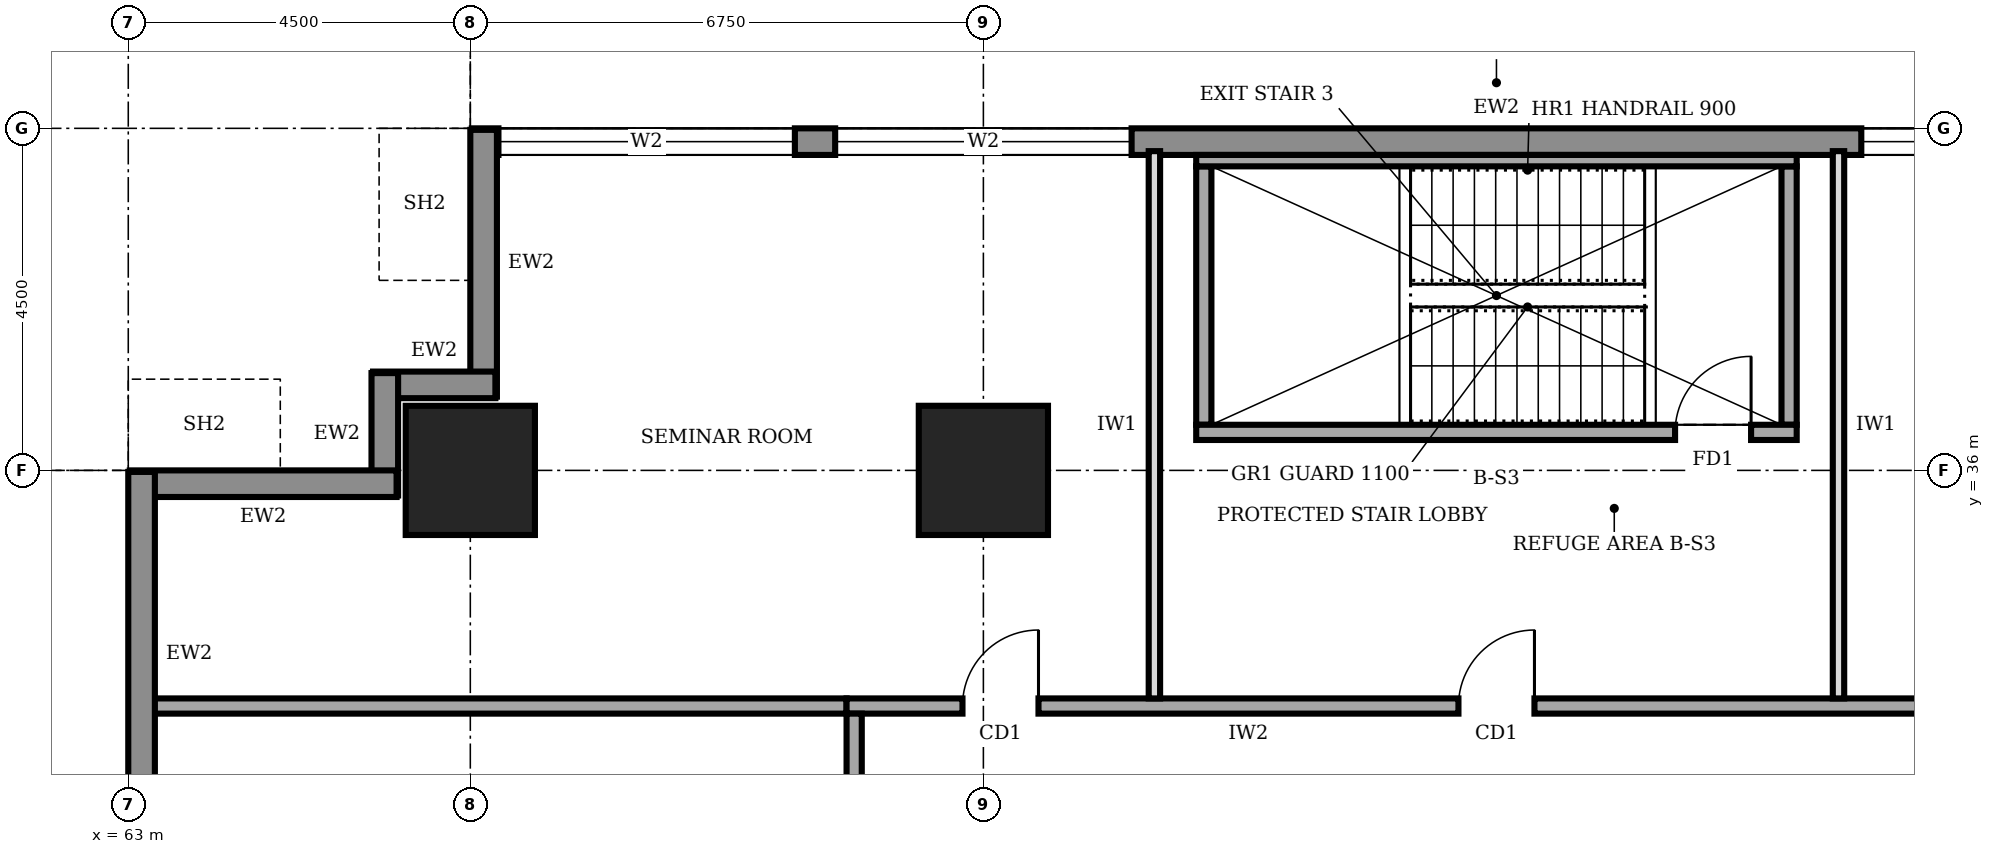
"""IFC4 building model, lengths in metres.
Left out: names, types, materials, properties, quantities, classifications, styles, units other than length and angle.
Written with IfcOpenShell. Run it as: python <this file> out.ifc"""

import sys

from ifc_helpers import new_model, si_unit, direction, frame, frame_2d, origin, origin_2d, place, context, subcontext, project, spatial, rectangle, extrude, element, fill, save


model = new_model("IFC4")
c1 = context("Model", 3, precision=1e-05, world=origin(), true_north=direction((0.0, 1.0)))
c2 = subcontext(c1, "Body", "Model", "MODEL_VIEW")
j1 = project(units=[si_unit("LENGTHUNIT", "METRE"), si_unit("PLANEANGLEUNIT", "RADIAN")], contexts=[c1])
p1 = place(None, origin())
s1 = spatial("IfcSite", under=j1, at=p1, CompositionType="ELEMENT")
p2 = place(p1, origin())
s2 = spatial("IfcBuilding", under=s1, at=p2, CompositionType="ELEMENT")
p3 = place(p2, frame((0.0, 0.0, 65.0)))
s3 = spatial("IfcBuildingStorey", under=s2, at=p3, CompositionType="ELEMENT", Elevation=65.0)
for number, where, z_axis, x_axis in (
    (1, (67.5, 36.0, 0.0), (0.0, 0.0, 1.0), (1.0, 0.0, 0.0)),
    (2, (74.25, 36.0, 0.0), (0.0, 0.0, 1.0), (1.0, 0.0, 0.0)),
):
    element("IfcColumn", number, at=place(p3, frame(where, z_axis=z_axis, x_axis=x_axis)), inside=s3, PredefinedType="COLUMN", context=c2, shape_type="SweptSolid", body=[
        extrude(rectangle(XDim=1.7, YDim=1.7, at=origin_2d()), origin(), (0.0, 0.0, 1.0), 4.0),
    ])
p4 = place(p3, frame((94.48, 40.325, 0.0), z_axis=(0.0, 0.0, 1.0), x_axis=(-1.0, 0.0, 0.0)))
e3 = element("IfcWall", 3, at=p4, inside=s3, PredefinedType="STANDARD", context=c2, shape_type="SweptSolid", body=[
    extrude(rectangle(XDim=26.96, YDim=0.35, at=frame_2d((13.48, 0.0))), origin(), (0.0, 0.0, 1.0), 3.75),
])
p5 = place(p4, frame((22.71, 0.0, 0.6)))
e4 = element("IfcOpeningElement", 4, at=p5, cuts=e3, PredefinedType="OPENING", context=c2, shape_type="SweptSolid", body=[
    extrude(rectangle(XDim=3.9, YDim=2.6, at=frame_2d((1.95, 1.3))), frame((0.0, 0.185, 0.0), z_axis=(0.0, -1.0, 0.0), x_axis=(1.0, 0.0, 0.0)), (0.0, 0.0, 1.0), 0.37),
])
p6 = place(p4, frame((18.28, 0.0, 0.6)))
e5 = element("IfcOpeningElement", 5, at=p6, cuts=e3, PredefinedType="OPENING", context=c2, shape_type="SweptSolid", body=[
    extrude(rectangle(XDim=3.9, YDim=2.6, at=frame_2d((1.95, 1.3))), frame((0.0, 0.185, 0.0), z_axis=(0.0, -1.0, 0.0), x_axis=(1.0, 0.0, 0.0)), (0.0, 0.0, 1.0), 0.37),
])
p7 = place(p4, frame((4.78, 0.0, 0.6)))
e6 = element("IfcOpeningElement", 6, at=p7, cuts=e3, PredefinedType="OPENING", context=c2, shape_type="SweptSolid", body=[
    extrude(rectangle(XDim=3.9, YDim=2.6, at=frame_2d((1.95, 1.3))), frame((0.0, 0.185, 0.0), z_axis=(0.0, -1.0, 0.0), x_axis=(1.0, 0.0, 0.0)), (0.0, 0.0, 1.0), 0.37),
])
p8 = place(p3, frame((67.675, 40.48, 0.0), z_axis=(0.0, 0.0, 1.0), x_axis=(0.0, -1.0, 0.0)))
e7 = element("IfcWall", 7, at=p8, inside=s3, PredefinedType="STANDARD", context=c2, shape_type="SweptSolid", body=[
    extrude(rectangle(XDim=3.51, YDim=0.35, at=frame_2d((1.755, 0.0))), origin(), (0.0, 0.0, 1.0), 2.85),
])
for number, where, z_axis, x_axis in (
    (8, (67.83, 37.125, 0.0), (0.0, 0.0, 1.0), (-1.0, 0.0, 0.0)),
    (9, (66.375, 37.28, 0.0), (0.0, 0.0, 1.0), (0.0, -1.0, 0.0)),
):
    element("IfcWall", number, at=place(p3, frame(where, z_axis=z_axis, x_axis=x_axis)), inside=s3, PredefinedType="STANDARD", context=c2, shape_type="SweptSolid", body=[
        extrude(rectangle(XDim=1.61, YDim=0.35, at=frame_2d((0.805, 0.0))), origin(), (0.0, 0.0, 1.0), 3.75),
    ])
p9 = place(p3, frame((66.53, 35.825, 0.0), z_axis=(0.0, 0.0, 1.0), x_axis=(-1.0, 0.0, 0.0)))
e10 = element("IfcWall", 10, at=p9, inside=s3, PredefinedType="STANDARD", context=c2, shape_type="SweptSolid", body=[
    extrude(rectangle(XDim=3.51, YDim=0.35, at=frame_2d((1.755, 0.0))), origin(), (0.0, 0.0, 1.0), 2.85),
])
p10 = place(p3, frame((63.175, 35.98, 0.0), z_axis=(0.0, 0.0, 1.0), x_axis=(0.0, -1.0, 0.0)))
e11 = element("IfcWall", 11, at=p10, inside=s3, PredefinedType="STANDARD", context=c2, shape_type="SweptSolid", body=[
    extrude(rectangle(XDim=31.46, YDim=0.35, at=frame_2d((15.73, 0.0))), origin(), (0.0, 0.0, 1.0), 3.75),
])
p11 = place(p10, frame((27.21, 0.0, 0.6)))
e12 = element("IfcOpeningElement", 12, at=p11, cuts=e11, PredefinedType="OPENING", context=c2, shape_type="SweptSolid", body=[
    extrude(rectangle(XDim=3.9, YDim=2.6, at=frame_2d((1.95, 1.3))), frame((0.0, 0.185, 0.0), z_axis=(0.0, -1.0, 0.0), x_axis=(1.0, 0.0, 0.0)), (0.0, 0.0, 1.0), 0.37),
])
p12 = place(p10, frame((22.78, 0.0, 0.6)))
e13 = element("IfcOpeningElement", 13, at=p12, cuts=e11, PredefinedType="OPENING", context=c2, shape_type="SweptSolid", body=[
    extrude(rectangle(XDim=3.9, YDim=2.6, at=frame_2d((1.95, 1.3))), frame((0.0, 0.185, 0.0), z_axis=(0.0, -1.0, 0.0), x_axis=(1.0, 0.0, 0.0)), (0.0, 0.0, 1.0), 0.37),
])
p13 = place(p10, frame((18.28, 0.0, 0.6)))
e14 = element("IfcOpeningElement", 14, at=p13, cuts=e11, PredefinedType="OPENING", context=c2, shape_type="SweptSolid", body=[
    extrude(rectangle(XDim=3.9, YDim=2.6, at=frame_2d((1.95, 1.3))), frame((0.0, 0.185, 0.0), z_axis=(0.0, -1.0, 0.0), x_axis=(1.0, 0.0, 0.0)), (0.0, 0.0, 1.0), 0.37),
])
p14 = place(p10, frame((13.78, 0.0, 0.6)))
e15 = element("IfcOpeningElement", 15, at=p14, cuts=e11, PredefinedType="OPENING", context=c2, shape_type="SweptSolid", body=[
    extrude(rectangle(XDim=3.9, YDim=2.6, at=frame_2d((1.95, 1.3))), frame((0.0, 0.185, 0.0), z_axis=(0.0, -1.0, 0.0), x_axis=(1.0, 0.0, 0.0)), (0.0, 0.0, 1.0), 0.37),
])
p15 = place(p10, frame((9.28, 0.0, 0.6)))
e16 = element("IfcOpeningElement", 16, at=p15, cuts=e11, PredefinedType="OPENING", context=c2, shape_type="SweptSolid", body=[
    extrude(rectangle(XDim=3.9, YDim=2.6, at=frame_2d((1.95, 1.3))), frame((0.0, 0.185, 0.0), z_axis=(0.0, -1.0, 0.0), x_axis=(1.0, 0.0, 0.0)), (0.0, 0.0, 1.0), 0.37),
])
p16 = place(p10, frame((4.78, 0.0, 0.6)))
e17 = element("IfcOpeningElement", 17, at=p16, cuts=e11, PredefinedType="OPENING", context=c2, shape_type="SweptSolid", body=[
    extrude(rectangle(XDim=3.9, YDim=2.6, at=frame_2d((1.95, 1.3))), frame((0.0, 0.185, 0.0), z_axis=(0.0, -1.0, 0.0), x_axis=(1.0, 0.0, 0.0)), (0.0, 0.0, 1.0), 0.37),
])
p17 = place(p3, frame((89.35, 32.9, 0.0), z_axis=(0.0, 0.0, 1.0), x_axis=(-1.0, 0.0, 0.0)))
e18 = element("IfcWall", 18, at=p17, inside=s3, PredefinedType="SOLIDWALL", context=c2, shape_type="SweptSolid", body=[
    extrude(rectangle(XDim=16.9, YDim=0.2, at=frame_2d((8.45, 0.0))), origin(), (0.0, 0.0, 1.0), 3.75),
])
p18 = place(p17, frame((14.375, 0.0, 0.0)))
e19 = element("IfcOpeningElement", 19, at=p18, cuts=e18, PredefinedType="OPENING", context=c2, shape_type="SweptSolid", body=[
    extrude(rectangle(XDim=1.0, YDim=2.1, at=frame_2d((0.5, 1.05))), frame((0.0, 0.11, 0.0), z_axis=(0.0, -1.0, 0.0), x_axis=(1.0, 0.0, 0.0)), (0.0, 0.0, 1.0), 0.22),
])
p19 = place(p17, frame((7.85, 0.0, 0.0)))
e20 = element("IfcOpeningElement", 20, at=p19, cuts=e18, PredefinedType="OPENING", context=c2, shape_type="SweptSolid", body=[
    extrude(rectangle(XDim=1.0, YDim=2.1, at=frame_2d((0.5, 1.05))), frame((0.0, 0.11, 0.0), z_axis=(0.0, -1.0, 0.0), x_axis=(1.0, 0.0, 0.0)), (0.0, 0.0, 1.0), 0.22),
])
p20 = place(p17, frame((1.325, 0.0, 0.0)))
e21 = element("IfcOpeningElement", 21, at=p20, cuts=e18, PredefinedType="OPENING", context=c2, shape_type="SweptSolid", body=[
    extrude(rectangle(XDim=1.0, YDim=2.1, at=frame_2d((0.5, 1.05))), frame((0.0, 0.11, 0.0), z_axis=(0.0, -1.0, 0.0), x_axis=(1.0, 0.0, 0.0)), (0.0, 0.0, 1.0), 0.22),
])
p21 = place(p3, frame((72.55, 32.8, 0.0), z_axis=(0.0, 0.0, 1.0), x_axis=(0.0, -1.0, 0.0)))
e22 = element("IfcWall", 22, at=p21, inside=s3, PredefinedType="SOLIDWALL", context=c2, shape_type="SweptSolid", body=[
    extrude(rectangle(XDim=25.3, YDim=0.2, at=frame_2d((12.65, 0.0))), origin(), (0.0, 0.0, 1.0), 3.75),
])
p22 = place(p21, frame((19.55, 0.0, 0.0)))
e23 = element("IfcOpeningElement", 23, at=p22, cuts=e22, PredefinedType="OPENING", context=c2, shape_type="SweptSolid", body=[
    extrude(rectangle(XDim=1.0, YDim=2.1, at=frame_2d((0.5, 1.05))), frame((0.0, 0.11, 0.0), z_axis=(0.0, -1.0, 0.0), x_axis=(1.0, 0.0, 0.0)), (0.0, 0.0, 1.0), 0.22),
])
p23 = place(p21, frame((6.4, 0.0, 0.0)))
e24 = element("IfcOpeningElement", 24, at=p23, cuts=e22, PredefinedType="OPENING", context=c2, shape_type="SweptSolid", body=[
    extrude(rectangle(XDim=1.8, YDim=2.1, at=frame_2d((0.9, 1.05))), frame((0.0, 0.11, 0.0), z_axis=(0.0, -1.0, 0.0), x_axis=(1.0, 0.0, 0.0)), (0.0, 0.0, 1.0), 0.22),
])
p24 = place(p3, frame((63.3, 32.9, 0.0), z_axis=(0.0, 0.0, 1.0), x_axis=(1.0, 0.0, 0.0)))
e25 = element("IfcWall", 25, at=p24, inside=s3, PredefinedType="SOLIDWALL", context=c2, shape_type="SweptSolid", body=[
    extrude(rectangle(XDim=9.15, YDim=0.2, at=frame_2d((4.575, 0.0))), origin(), (0.0, 0.0, 1.0), 3.75),
])
for number, where, z_axis, x_axis in (
    (26, (76.5, 33.0, 0.0), (0.0, 0.0, 1.0), (0.0, 1.0, 0.0)),
    (27, (85.5, 33.0, 0.0), (0.0, 0.0, 1.0), (0.0, 1.0, 0.0)),
):
    element("IfcWall", number, at=place(p3, frame(where, z_axis=z_axis, x_axis=x_axis)), inside=s3, PredefinedType="PARTITIONING", context=c2, shape_type="SweptSolid", body=[
        extrude(rectangle(XDim=7.2, YDim=0.15, at=frame_2d((3.6, 0.0))), origin(), (0.0, 0.0, 1.0), 3.75),
    ])
p25 = place(p3, frame((77.05, 36.5, 0.0), z_axis=(0.0, 0.0, 1.0), x_axis=(1.0, 0.0, 0.0)))
e28 = element("IfcWall", 28, at=p25, inside=s3, PredefinedType="SOLIDWALL", context=c2, shape_type="SweptSolid", body=[
    extrude(rectangle(XDim=7.9, YDim=0.2, at=frame_2d((3.95, 0.0))), origin(), (0.0, 0.0, 1.0), 3.75),
])
p26 = place(p25, frame((6.3, 0.0, 0.0)))
e29 = element("IfcOpeningElement", 29, at=p26, cuts=e28, PredefinedType="OPENING", context=c2, shape_type="SweptSolid", body=[
    extrude(rectangle(XDim=1.0, YDim=2.1, at=frame_2d((0.5, 1.05))), frame((0.0, 0.11, 0.0), z_axis=(0.0, -1.0, 0.0), x_axis=(1.0, 0.0, 0.0)), (0.0, 0.0, 1.0), 0.22),
])
p27 = place(p3, frame((77.05, 40.075, 0.0), z_axis=(0.0, 0.0, 1.0), x_axis=(1.0, 0.0, 0.0)))
e30 = element("IfcWall", 30, at=p27, inside=s3, PredefinedType="SOLIDWALL", context=c2, shape_type="SweptSolid", body=[
    extrude(rectangle(XDim=7.9, YDim=0.15, at=frame_2d((3.95, 0.0))), origin(), (0.0, 0.0, 1.0), 3.75),
])
for number, where, z_axis, x_axis in (
    (31, (77.15, 36.6, 0.0), (0.0, 0.0, 1.0), (0.0, 1.0, 0.0)),
    (32, (84.85, 36.6, 0.0), (0.0, 0.0, 1.0), (0.0, 1.0, 0.0)),
):
    element("IfcWall", number, at=place(p3, frame(where, z_axis=z_axis, x_axis=x_axis)), inside=s3, PredefinedType="SOLIDWALL", context=c2, shape_type="SweptSolid", body=[
        extrude(rectangle(XDim=3.4, YDim=0.2, at=frame_2d((1.7, 0.0))), origin(), (0.0, 0.0, 1.0), 3.75),
    ])
p28 = place(p5, origin())
e33 = element("IfcWindow", 33, at=p28, inside=s3, PartitioningType="SINGLE_PANEL", PredefinedType="WINDOW", context=c2, shape_type="SweptSolid", body=[
    extrude(rectangle(XDim=3.9, YDim=2.6, at=frame_2d((1.95, 1.3))), frame((0.0, 0.03, 0.0), z_axis=(0.0, -1.0, 0.0), x_axis=(1.0, 0.0, 0.0)), (0.0, 0.0, 1.0), 0.06),
])
fill(e4, e33)
p29 = place(p6, origin())
e34 = element("IfcWindow", 34, at=p29, inside=s3, PartitioningType="SINGLE_PANEL", PredefinedType="WINDOW", context=c2, shape_type="SweptSolid", body=[
    extrude(rectangle(XDim=3.9, YDim=2.6, at=frame_2d((1.95, 1.3))), frame((0.0, 0.03, 0.0), z_axis=(0.0, -1.0, 0.0), x_axis=(1.0, 0.0, 0.0)), (0.0, 0.0, 1.0), 0.06),
])
fill(e5, e34)
p30 = place(p7, origin())
e35 = element("IfcWindow", 35, at=p30, inside=s3, PartitioningType="SINGLE_PANEL", PredefinedType="WINDOW", context=c2, shape_type="SweptSolid", body=[
    extrude(rectangle(XDim=3.9, YDim=2.6, at=frame_2d((1.95, 1.3))), frame((0.0, 0.03, 0.0), z_axis=(0.0, -1.0, 0.0), x_axis=(1.0, 0.0, 0.0)), (0.0, 0.0, 1.0), 0.06),
])
fill(e6, e35)
p31 = place(p18, frame((1.0, 0.0, 0.0), z_axis=(0.0, 0.0, 1.0), x_axis=(-1.0, 0.0, 0.0)))
e36 = element("IfcDoor", 36, at=p31, inside=s3, OperationType="SINGLE_SWING_RIGHT", PredefinedType="DOOR", context=c2, shape_type="SweptSolid", body=[
    extrude(rectangle(XDim=1.0, YDim=2.1, at=frame_2d((0.5, 1.05))), frame((0.0, 0.025, 0.0), z_axis=(0.0, -1.0, 0.0), x_axis=(1.0, 0.0, 0.0)), (0.0, 0.0, 1.0), 0.05),
])
fill(e19, e36)
p32 = place(p19, frame((1.0, 0.0, 0.0), z_axis=(0.0, 0.0, 1.0), x_axis=(-1.0, 0.0, 0.0)))
e37 = element("IfcDoor", 37, at=p32, inside=s3, OperationType="SINGLE_SWING_RIGHT", PredefinedType="DOOR", context=c2, shape_type="SweptSolid", body=[
    extrude(rectangle(XDim=1.0, YDim=2.1, at=frame_2d((0.5, 1.05))), frame((0.0, 0.025, 0.0), z_axis=(0.0, -1.0, 0.0), x_axis=(1.0, 0.0, 0.0)), (0.0, 0.0, 1.0), 0.05),
])
fill(e20, e37)
p33 = place(p26, origin())
e38 = element("IfcDoor", 38, at=p33, inside=s3, OperationType="SINGLE_SWING_RIGHT", PredefinedType="DOOR", context=c2, shape_type="SweptSolid", body=[
    extrude(rectangle(XDim=1.0, YDim=2.1, at=frame_2d((0.5, 1.05))), frame((0.0, 0.025, 0.0), z_axis=(0.0, -1.0, 0.0), x_axis=(1.0, 0.0, 0.0)), (0.0, 0.0, 1.0), 0.05),
])
fill(e29, e38)
save(model, sys.argv[1])
